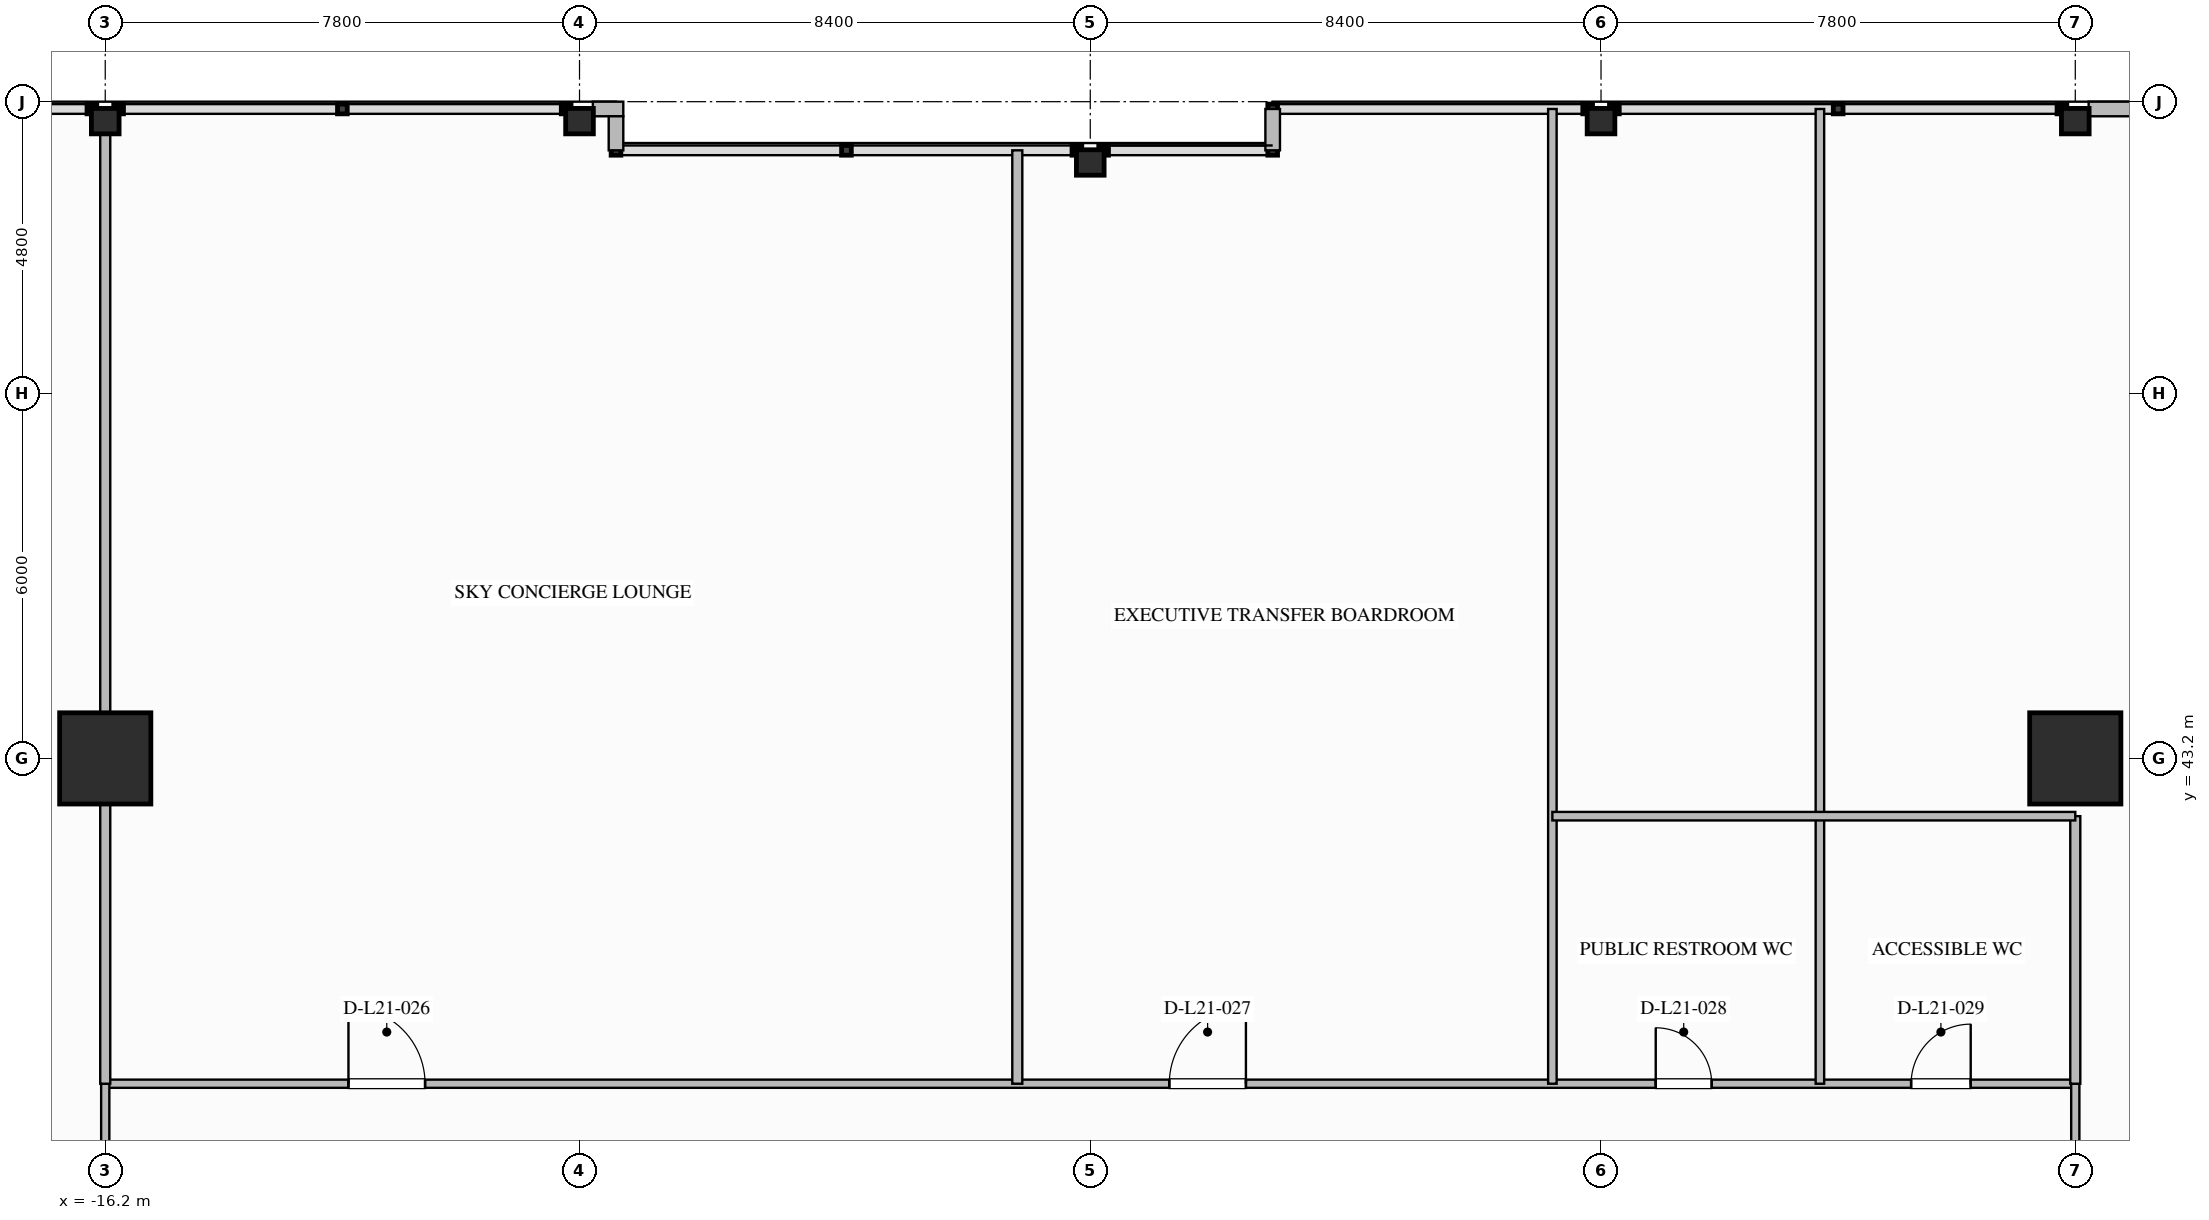
"""IFC4 building model, lengths in metres.
Left out: names, types, materials, properties, quantities, classifications, styles, units other than length and angle.
Written with IfcOpenShell. Run it as: python <this file> out.ifc"""

import sys

from ifc_helpers import new_model, si_unit, direction, frame, frame_2d, origin, origin_2d, place, context, subcontext, project, spatial, rectangle, i_section, extrude, element, fill, save


model = new_model("IFC4")
c1 = context("Model", 3, precision=1e-05, world=origin(), true_north=direction((0.0, 1.0)))
c2 = subcontext(c1, "Body", "Model", "MODEL_VIEW")
j1 = project(units=[si_unit("LENGTHUNIT", "METRE"), si_unit("PLANEANGLEUNIT", "RADIAN")], contexts=[c1])
p1 = place(None, origin())
s1 = spatial("IfcSite", under=j1, at=p1, CompositionType="ELEMENT")
p2 = place(p1, origin())
s2 = spatial("IfcBuilding", under=s1, at=p2, CompositionType="ELEMENT")
p3 = place(p2, frame((0.0, 0.0, 87.2)))
s3 = spatial("IfcBuildingStorey", under=s2, at=p3, CompositionType="ELEMENT", Elevation=87.2)
for number, where, z_axis, x_axis in (
    (1, (-16.2, 43.2, 0.0), (0.0, 0.0, 1.0), (1.0, 0.0, 0.0)),
    (2, (16.2, 43.2, 0.0), (0.0, 0.0, 1.0), (1.0, 0.0, 0.0)),
):
    element("IfcColumn", number, at=place(p3, frame(where, z_axis=z_axis, x_axis=x_axis)), inside=s3, PredefinedType="COLUMN", context=c2, shape_type="SweptSolid", body=[
        extrude(rectangle(XDim=1.5, YDim=1.5, at=origin_2d()), origin(), (0.0, 0.0, 1.0), 4.6),
    ])
for number, where, z_axis, x_axis in (
    (3, (-16.2, 53.68, 0.0), (0.0, 0.0, 1.0), (0.0, 1.0, 0.0)),
    (4, (-8.4, 53.68, 0.0), (0.0, 0.0, 1.0), (0.0, 1.0, 0.0)),
    (5, (0.0, 53.0, 0.0), (0.0, 0.0, 1.0), (0.0, 1.0, 0.0)),
    (6, (8.4, 53.68, 0.0), (0.0, 0.0, 1.0), (0.0, 1.0, 0.0)),
    (7, (16.2, 53.68, 0.0), (0.0, 0.0, 1.0), (0.0, 1.0, 0.0)),
):
    element("IfcColumn", number, at=place(p3, frame(where, z_axis=z_axis, x_axis=x_axis)), inside=s3, PredefinedType="COLUMN", context=c2, shape_type="SweptSolid", body=[
        extrude(i_section(OverallWidth=0.418, OverallDepth=0.455, WebThickness=0.042, FlangeThickness=0.068, FilletRadius=0.03, at=origin_2d()), origin(), (0.0, 0.0, 1.0), 4.597),
    ])
p4 = place(p3, frame((-8.18, 53.88, 0.0), z_axis=(0.0, 0.0, 1.0), x_axis=(1.0, 0.0, 0.0)))
e8 = element("IfcWall", 8, at=p4, inside=s3, PredefinedType="STANDARD", context=c2, shape_type="SweptSolid", body=[
    extrude(rectangle(XDim=0.5, YDim=0.24, at=frame_2d((0.25, 0.0))), origin(), (0.0, 0.0, 1.0), 4.34),
])
p5 = place(p3, frame((16.42, 53.88, 0.0), z_axis=(0.0, 0.0, 1.0), x_axis=(1.0, 0.0, 0.0)))
e9 = element("IfcWall", 9, at=p5, inside=s3, PredefinedType="STANDARD", context=c2, shape_type="SweptSolid", body=[
    extrude(rectangle(XDim=1.4, YDim=0.24, at=frame_2d((0.7, 0.0))), origin(), (0.0, 0.0, 1.0), 4.34),
])
p6 = place(p3, frame((-7.8, 53.76, 0.0), z_axis=(0.0, 0.0, 1.0), x_axis=(0.0, -1.0, 0.0)))
e10 = element("IfcWall", 10, at=p6, inside=s3, PredefinedType="STANDARD", context=c2, shape_type="SweptSolid", body=[
    extrude(rectangle(XDim=0.56, YDim=0.24, at=frame_2d((0.28, 0.0))), origin(), (0.0, 0.0, 1.0), 4.34),
])
p7 = place(p3, frame((3.0, 53.2, 0.0), z_axis=(0.0, 0.0, 1.0), x_axis=(0.0, 1.0, 0.0)))
e11 = element("IfcWall", 11, at=p7, inside=s3, PredefinedType="STANDARD", context=c2, shape_type="SweptSolid", body=[
    extrude(rectangle(XDim=0.68, YDim=0.24, at=frame_2d((0.34, 0.0))), origin(), (0.0, 0.0, 1.0), 4.34),
])
p8 = place(p3, frame((-16.2, 37.85, 0.0), z_axis=(0.0, 0.0, 1.0), x_axis=(1.0, 0.0, 0.0)))
e12 = element("IfcWall", 12, at=p8, inside=s3, PredefinedType="PARTITIONING", context=c2, shape_type="SweptSolid", body=[
    extrude(rectangle(XDim=32.4, YDim=0.135, at=frame_2d((16.2, 0.0))), origin(), (0.0, 0.0, 1.0), 4.34),
])
p9 = place(p8, frame((4.0, 0.0, 0.0)))
e13 = element("IfcOpeningElement", 13, at=p9, cuts=e12, PredefinedType="OPENING", context=c2, shape_type="SweptSolid", body=[
    extrude(rectangle(XDim=1.26, YDim=2.2, at=frame_2d((0.63, 1.1))), frame((0.0, 0.077, 0.0), z_axis=(0.0, -1.0, 0.0), x_axis=(1.0, 0.0, 0.0)), (0.0, 0.0, 1.0), 0.155),
])
p10 = place(p8, frame((17.5, 0.0, 0.0)))
e14 = element("IfcOpeningElement", 14, at=p10, cuts=e12, PredefinedType="OPENING", context=c2, shape_type="SweptSolid", body=[
    extrude(rectangle(XDim=1.26, YDim=2.2, at=frame_2d((0.63, 1.1))), frame((0.0, 0.077, 0.0), z_axis=(0.0, -1.0, 0.0), x_axis=(1.0, 0.0, 0.0)), (0.0, 0.0, 1.0), 0.155),
])
p11 = place(p8, frame((25.5, 0.0, 0.0)))
e15 = element("IfcOpeningElement", 15, at=p11, cuts=e12, PredefinedType="OPENING", context=c2, shape_type="SweptSolid", body=[
    extrude(rectangle(XDim=0.92, YDim=2.1, at=frame_2d((0.46, 1.05))), frame((0.0, 0.077, 0.0), z_axis=(0.0, -1.0, 0.0), x_axis=(1.0, 0.0, 0.0)), (0.0, 0.0, 1.0), 0.155),
])
p12 = place(p8, frame((29.7, 0.0, 0.0)))
e16 = element("IfcOpeningElement", 16, at=p12, cuts=e12, PredefinedType="OPENING", context=c2, shape_type="SweptSolid", body=[
    extrude(rectangle(XDim=0.98, YDim=2.1, at=frame_2d((0.49, 1.05))), frame((0.0, 0.077, 0.0), z_axis=(0.0, -1.0, 0.0), x_axis=(1.0, 0.0, 0.0)), (0.0, 0.0, 1.0), 0.155),
])
for number, where, z_axis, x_axis in (
    (17, (-16.2, 35.7, 0.0), (0.0, 0.0, 1.0), (0.0, 1.0, 0.0)),
    (18, (16.2, 35.7, 0.0), (0.0, 0.0, 1.0), (0.0, 1.0, 0.0)),
):
    element("IfcWall", number, at=place(p3, frame(where, z_axis=z_axis, x_axis=x_axis)), inside=s3, PredefinedType="PARTITIONING", context=c2, shape_type="SweptSolid", body=[
        extrude(rectangle(XDim=2.15, YDim=0.135, at=frame_2d((1.075, 0.0))), origin(), (0.0, 0.0, 1.0), 3.552),
    ])
p13 = place(p3, frame((-16.2, 37.85, 0.0), z_axis=(0.0, 0.0, 1.0), x_axis=(0.0, 1.0, 0.0)))
e19 = element("IfcWall", 19, at=p13, inside=s3, PredefinedType="PARTITIONING", context=c2, shape_type="SweptSolid", body=[
    extrude(rectangle(XDim=16.03, YDim=0.165, at=frame_2d((8.015, 0.0))), origin(), (0.0, 0.0, 1.0), 3.552),
])
p14 = place(p3, frame((16.2, 37.85, 0.0), z_axis=(0.0, 0.0, 1.0), x_axis=(0.0, 1.0, 0.0)))
e20 = element("IfcWall", 20, at=p14, inside=s3, PredefinedType="PARTITIONING", context=c2, shape_type="SweptSolid", body=[
    extrude(rectangle(XDim=4.4, YDim=0.165, at=frame_2d((2.2, 0.0))), origin(), (0.0, 0.0, 1.0), 3.552),
])
p15 = place(p3, frame((-1.2, 37.85, 0.0), z_axis=(0.0, 0.0, 1.0), x_axis=(0.0, 1.0, 0.0)))
e21 = element("IfcWall", 21, at=p15, inside=s3, PredefinedType="PARTITIONING", context=c2, shape_type="SweptSolid", body=[
    extrude(rectangle(XDim=15.35, YDim=0.165, at=frame_2d((7.675, 0.0))), origin(), (0.0, 0.0, 1.0), 4.34),
])
for number, where, z_axis, x_axis in (
    (22, (7.6, 37.85, 0.0), (0.0, 0.0, 1.0), (0.0, 1.0, 0.0)),
    (23, (12.0, 37.85, 0.0), (0.0, 0.0, 1.0), (0.0, 1.0, 0.0)),
):
    element("IfcWall", number, at=place(p3, frame(where, z_axis=z_axis, x_axis=x_axis)), inside=s3, PredefinedType="PLUMBINGWALL", context=c2, shape_type="SweptSolid", body=[
        extrude(rectangle(XDim=16.03, YDim=0.14, at=frame_2d((8.015, 0.0))), origin(), (0.0, 0.0, 1.0), 4.34),
    ])
p16 = place(p3, frame((7.6, 42.25, 0.0), z_axis=(0.0, 0.0, 1.0), x_axis=(1.0, 0.0, 0.0)))
e24 = element("IfcWall", 24, at=p16, inside=s3, PredefinedType="PLUMBINGWALL", context=c2, shape_type="SweptSolid", body=[
    extrude(rectangle(XDim=8.6, YDim=0.14, at=frame_2d((4.3, 0.0))), origin(), (0.0, 0.0, 1.0), 4.34),
])
p17 = place(p9, origin())
e25 = element("IfcDoor", 25, at=p17, inside=s3, OperationType="SINGLE_SWING_LEFT", PredefinedType="DOOR", context=c2, shape_type="SweptSolid", body=[
    extrude(rectangle(XDim=1.26, YDim=2.2, at=frame_2d((0.63, 1.1))), frame((0.0, 0.025, 0.0), z_axis=(0.0, -1.0, 0.0), x_axis=(1.0, 0.0, 0.0)), (0.0, 0.0, 1.0), 0.05),
])
fill(e13, e25)
p18 = place(p10, origin())
e26 = element("IfcDoor", 26, at=p18, inside=s3, OperationType="SINGLE_SWING_RIGHT", PredefinedType="DOOR", context=c2, shape_type="SweptSolid", body=[
    extrude(rectangle(XDim=1.26, YDim=2.2, at=frame_2d((0.63, 1.1))), frame((0.0, 0.025, 0.0), z_axis=(0.0, -1.0, 0.0), x_axis=(1.0, 0.0, 0.0)), (0.0, 0.0, 1.0), 0.05),
])
fill(e14, e26)
p19 = place(p11, origin())
e27 = element("IfcDoor", 27, at=p19, inside=s3, OperationType="SINGLE_SWING_LEFT", PredefinedType="DOOR", context=c2, shape_type="SweptSolid", body=[
    extrude(rectangle(XDim=0.92, YDim=2.1, at=frame_2d((0.46, 1.05))), frame((0.0, 0.025, 0.0), z_axis=(0.0, -1.0, 0.0), x_axis=(1.0, 0.0, 0.0)), (0.0, 0.0, 1.0), 0.05),
])
fill(e15, e27)
p20 = place(p12, origin())
e28 = element("IfcDoor", 28, at=p20, inside=s3, OperationType="SINGLE_SWING_RIGHT", PredefinedType="DOOR", context=c2, shape_type="SweptSolid", body=[
    extrude(rectangle(XDim=0.98, YDim=2.1, at=frame_2d((0.49, 1.05))), frame((0.0, 0.025, 0.0), z_axis=(0.0, -1.0, 0.0), x_axis=(1.0, 0.0, 0.0)), (0.0, 0.0, 1.0), 0.05),
])
fill(e16, e28)
save(model, sys.argv[1])
